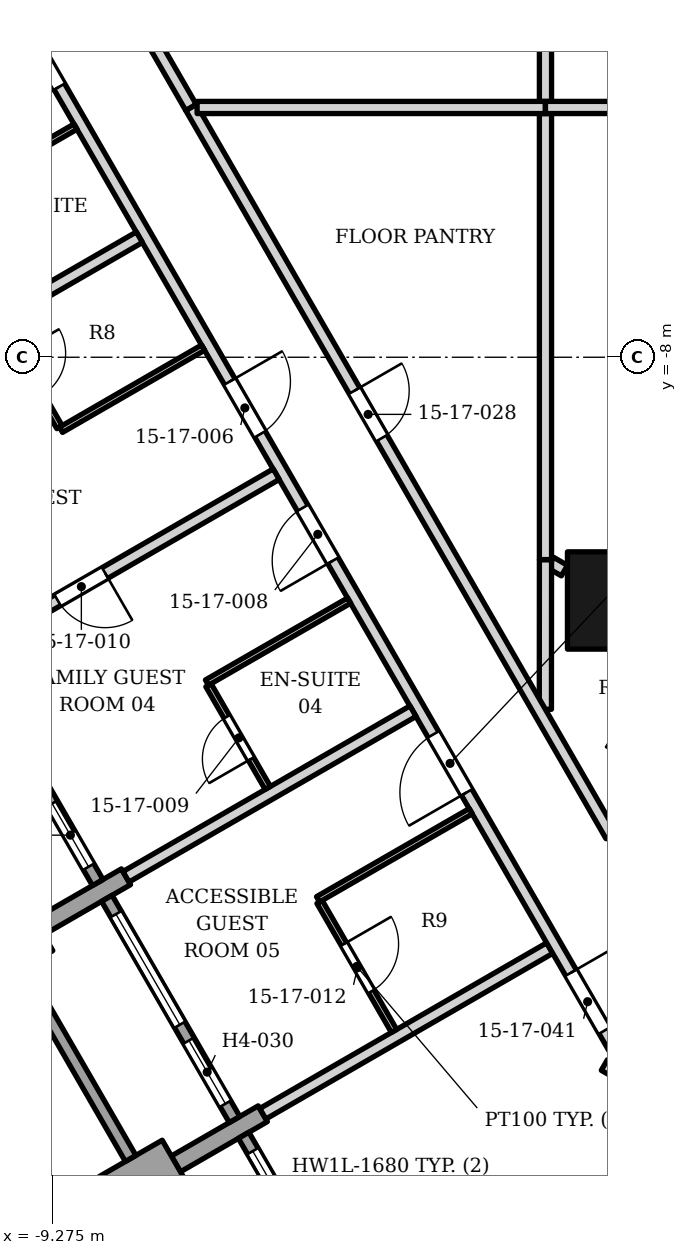
"""IFC4 building model, lengths in metres.
Left out: names, types, materials, properties, quantities, classifications, styles, units other than length and angle.
Written with IfcOpenShell. Run it as: python <this file> out.ifc"""

import sys

from ifc_helpers import new_model, si_unit, direction, frame, frame_2d, origin, origin_2d, place, context, subcontext, project, spatial, rectangle, extrude, element, fill, save


model = new_model("IFC4")
c1 = context("Model", 3, precision=1e-05, world=origin(), true_north=direction((0.0, 1.0)))
c2 = subcontext(c1, "Body", "Model", "MODEL_VIEW")
j1 = project(units=[si_unit("LENGTHUNIT", "METRE"), si_unit("PLANEANGLEUNIT", "RADIAN")], contexts=[c1])
p1 = place(None, origin())
s1 = spatial("IfcSite", under=j1, at=p1, CompositionType="ELEMENT")
p2 = place(p1, origin())
s2 = spatial("IfcBuilding", under=s1, at=p2, CompositionType="ELEMENT")
p3 = place(p2, frame((0.0, 0.0, 76.6)))
s3 = spatial("IfcBuildingStorey", under=s2, at=p3, CompositionType="ELEMENT", Elevation=76.6)
p4 = place(p3, frame((0.0, -12.0, 0.0), z_axis=(0.0, 0.0, 1.0), x_axis=(1.0, 0.0, 0.0)))
e1 = element("IfcColumn", 1, at=p4, inside=s3, PredefinedType="COLUMN", context=c2, shape_type="SweptSolid", body=[
    extrude(rectangle(XDim=1.6, YDim=1.6, at=origin_2d()), origin(), (0.0, 0.0, 1.0), 3.4),
])
p5 = place(p3, frame((-10.009, -17.669, 0.0), z_axis=(0.0, 0.0, 1.0), x_axis=(0.5, -0.866025403784, 0.0)))
e2 = element("IfcColumn", 2, at=p5, inside=s3, PredefinedType="COLUMN", context=c2, shape_type="SweptSolid", body=[
    extrude(rectangle(XDim=0.9, YDim=1.2, at=origin_2d()), origin(), (0.0, 0.0, 1.0), 3.4),
])
p6 = place(p3, frame((-9.49, -17.369, 0.0), z_axis=(0.0, 0.0, 1.0), x_axis=(0.865976140824, 0.500085316245, 0.0)))
e3 = element("IfcWall", 3, at=p6, inside=s3, PredefinedType="SOLIDWALL", context=c2, shape_type="SweptSolid", body=[
    extrude(rectangle(XDim=1.65, YDim=0.3, at=frame_2d((0.825, 0.0))), origin(), (0.0, 0.0, 1.0), 2.65),
])
p7 = place(p3, frame((-7.24, -21.266, 0.0), z_axis=(0.0, 0.0, 1.0), x_axis=(-0.866006032174, -0.500033551112, 0.0)))
e4 = element("IfcWall", 4, at=p7, inside=s3, PredefinedType="SOLIDWALL", context=c2, shape_type="SweptSolid", body=[
    extrude(rectangle(XDim=1.2, YDim=0.9, at=frame_2d((0.6, 0.0))), origin(), (0.0, 0.0, 1.0), 2.63),
])
p8 = place(p3, frame((-5.811, -20.441, 0.0), z_axis=(0.0, 0.0, 1.0), x_axis=(-0.866040211805, -0.499974350878, 0.0)))
e5 = element("IfcWall", 5, at=p8, inside=s3, PredefinedType="SOLIDWALL", context=c2, shape_type="SweptSolid", body=[
    extrude(rectangle(XDim=1.65, YDim=0.3, at=frame_2d((0.825, 0.0))), origin(), (0.0, 0.0, 1.0), 2.628),
])
p9 = place(p3, frame((-10.625, -13.001, 0.0), z_axis=(0.0, 0.0, 1.0), x_axis=(0.499958946799, -0.866049104564, 0.0)))
e6 = element("IfcWall", 6, at=p9, inside=s3, PredefinedType="ELEMENTEDWALL", context=c2, shape_type="SweptSolid", body=[
    extrude(rectangle(XDim=4.2, YDim=0.2, at=frame_2d((2.1, 0.0))), origin(), (0.0, 0.0, 1.0), 2.65),
])
p10 = place(p9, frame((0.3, 0.0, 0.6)))
e7 = element("IfcOpeningElement", 7, at=p10, cuts=e6, PredefinedType="OPENING", context=c2, shape_type="SweptSolid", body=[
    extrude(rectangle(XDim=2.1, YDim=1.8, at=frame_2d((1.05, 0.9))), frame((0.0, 0.11, 0.0), z_axis=(0.0, -1.0, 0.0), x_axis=(1.0, 0.0, 0.0)), (0.0, 0.0, 1.0), 0.22),
])
p11 = place(p9, frame((2.7, 0.0, 0.0)))
e8 = element("IfcOpeningElement", 8, at=p11, cuts=e6, PredefinedType="OPENING", context=c2, shape_type="SweptSolid", body=[
    extrude(rectangle(XDim=1.2, YDim=2.4, at=frame_2d((0.6, 1.2))), frame((0.0, 0.11, 0.0), z_axis=(0.0, -1.0, 0.0), x_axis=(1.0, 0.0, 0.0)), (0.0, 0.0, 1.0), 0.22),
])
p12 = place(p3, frame((-9.784, -18.058, 0.0), z_axis=(0.0, 0.0, 1.0), x_axis=(0.500012057535, -0.866018442252, 0.0)))
e9 = element("IfcWall", 9, at=p12, inside=s3, PredefinedType="SOLIDWALL", context=c2, shape_type="SweptSolid", body=[
    extrude(rectangle(XDim=3.6, YDim=0.2, at=frame_2d((1.8, 0.0))), origin(), (0.0, 0.0, 1.0), 2.63),
])
p13 = place(p3, frame((-8.375, -16.898, 0.0), z_axis=(0.0, 0.0, 1.0), x_axis=(0.49998411664, -0.866034573852, 0.0)))
e10 = element("IfcWall", 10, at=p13, inside=s3, PredefinedType="ELEMENTEDWALL", context=c2, shape_type="SweptSolid", body=[
    extrude(rectangle(XDim=4.2, YDim=0.2, at=frame_2d((2.1, 0.0))), origin(), (0.0, 0.0, 1.0), 2.628),
])
p14 = place(p13, frame((0.3, 0.0, 0.6)))
e11 = element("IfcOpeningElement", 11, at=p14, cuts=e10, PredefinedType="OPENING", context=c2, shape_type="SweptSolid", body=[
    extrude(rectangle(XDim=2.1, YDim=1.8, at=frame_2d((1.05, 0.9))), frame((0.0, 0.11, 0.0), z_axis=(0.0, -1.0, 0.0), x_axis=(1.0, 0.0, 0.0)), (0.0, 0.0, 1.0), 0.22),
])
p15 = place(p13, frame((2.7, 0.0, 0.0)))
e12 = element("IfcOpeningElement", 12, at=p15, cuts=e10, PredefinedType="OPENING", context=c2, shape_type="SweptSolid", body=[
    extrude(rectangle(XDim=1.2, YDim=2.4, at=frame_2d((0.6, 1.2))), frame((0.0, 0.11, 0.0), z_axis=(0.0, -1.0, 0.0), x_axis=(1.0, 0.0, 0.0)), (0.0, 0.0, 1.0), 0.22),
])
p16 = place(p3, frame((-6.125, -20.796, 0.0), z_axis=(0.0, 0.0, 1.0), x_axis=(0.49998411664, -0.866034573852, 0.0)))
e13 = element("IfcWall", 13, at=p16, inside=s3, PredefinedType="ELEMENTEDWALL", context=c2, shape_type="SweptSolid", body=[
    extrude(rectangle(XDim=4.2, YDim=0.2, at=frame_2d((2.1, 0.0))), origin(), (0.0, 0.0, 1.0), 2.384),
])
p17 = place(p16, frame((0.3, 0.0, 0.6)))
e14 = element("IfcOpeningElement", 14, at=p17, cuts=e13, PredefinedType="OPENING", context=c2, shape_type="SweptSolid", body=[
    extrude(rectangle(XDim=2.1, YDim=1.68, at=frame_2d((1.05, 0.84))), frame((0.0, 0.11, 0.0), z_axis=(0.0, -1.0, 0.0), x_axis=(1.0, 0.0, 0.0)), (0.0, 0.0, 1.0), 0.22),
])
p18 = place(p16, frame((2.7, 0.0, 0.0)))
e15 = element("IfcOpeningElement", 15, at=p18, cuts=e13, PredefinedType="OPENING", context=c2, shape_type="SweptSolid", body=[
    extrude(rectangle(XDim=1.2, YDim=2.28, at=frame_2d((0.6, 1.14))), frame((0.0, 0.11, 0.0), z_axis=(0.0, -1.0, 0.0), x_axis=(1.0, 0.0, 0.0)), (0.0, 0.0, 1.0), 0.22),
])
p19 = place(p3, frame((-5.81, -20.441, 0.0), z_axis=(0.0, 0.0, 1.0), x_axis=(0.866020710281, 0.500008129298, 0.0)))
e16 = element("IfcWall", 16, at=p19, inside=s3, PredefinedType="PARTITIONING", context=c2, shape_type="SweptSolid", body=[
    extrude(rectangle(XDim=5.45, YDim=0.2, at=frame_2d((2.725, 0.0))), origin(), (0.0, 0.0, 1.0), 2.384),
])
p20 = place(p3, frame((-0.193, -19.64, 0.0), z_axis=(0.0, 0.0, 1.0), x_axis=(0.866036131362, -0.49998141883, 0.0)))
e17 = element("IfcWall", 17, at=p20, inside=s3, PredefinedType="PARTITIONING", context=c2, shape_type="SweptSolid", body=[
    extrude(rectangle(XDim=2.802, YDim=0.2, at=frame_2d((1.401, 0.0))), origin(), (0.0, 0.0, 1.0), 2.384),
])
p21 = place(p3, frame((-11.206, 0.0, 0.0), z_axis=(0.0, 0.0, 1.0), x_axis=(0.500002959525, -0.866023695095, 0.0)))
e18 = element("IfcWall", 18, at=p21, inside=s3, PredefinedType="PARTITIONING", context=c2, shape_type="SweptSolid", body=[
    extrude(rectangle(XDim=22.351, YDim=0.2, at=frame_2d((11.175, 0.0))), origin(), (0.0, 0.0, 1.0), 2.242),
])
p22 = place(p21, frame((0.7, 0.0, 0.0)))
e19 = element("IfcOpeningElement", 19, at=p22, cuts=e18, PredefinedType="OPENING", context=c2, shape_type="SweptSolid", body=[
    extrude(rectangle(XDim=1.0, YDim=2.1, at=frame_2d((0.5, 1.05))), frame((0.0, 0.11, 0.0), z_axis=(0.0, -1.0, 0.0), x_axis=(1.0, 0.0, 0.0)), (0.0, 0.0, 1.0), 0.22),
])
p23 = place(p21, frame((3.1, 0.0, 0.0)))
e20 = element("IfcOpeningElement", 20, at=p23, cuts=e18, PredefinedType="OPENING", context=c2, shape_type="SweptSolid", body=[
    extrude(rectangle(XDim=1.0, YDim=2.1, at=frame_2d((0.5, 1.05))), frame((0.0, 0.11, 0.0), z_axis=(0.0, -1.0, 0.0), x_axis=(1.0, 0.0, 0.0)), (0.0, 0.0, 1.0), 0.22),
])
p24 = place(p21, frame((9.7, 0.0, 0.0)))
e21 = element("IfcOpeningElement", 21, at=p24, cuts=e18, PredefinedType="OPENING", context=c2, shape_type="SweptSolid", body=[
    extrude(rectangle(XDim=1.0, YDim=2.1, at=frame_2d((0.5, 1.05))), frame((0.0, 0.11, 0.0), z_axis=(0.0, -1.0, 0.0), x_axis=(1.0, 0.0, 0.0)), (0.0, 0.0, 1.0), 0.22),
])
p25 = place(p21, frame((12.1, 0.0, 0.0)))
e22 = element("IfcOpeningElement", 22, at=p25, cuts=e18, PredefinedType="OPENING", context=c2, shape_type="SweptSolid", body=[
    extrude(rectangle(XDim=1.0, YDim=2.1, at=frame_2d((0.5, 1.05))), frame((0.0, 0.11, 0.0), z_axis=(0.0, -1.0, 0.0), x_axis=(1.0, 0.0, 0.0)), (0.0, 0.0, 1.0), 0.22),
])
p26 = place(p21, frame((16.4, 0.0, 0.0)))
e23 = element("IfcOpeningElement", 23, at=p26, cuts=e18, PredefinedType="OPENING", context=c2, shape_type="SweptSolid", body=[
    extrude(rectangle(XDim=1.1, YDim=2.1, at=frame_2d((0.55, 1.05))), frame((0.0, 0.11, 0.0), z_axis=(0.0, -1.0, 0.0), x_axis=(1.0, 0.0, 0.0)), (0.0, 0.0, 1.0), 0.22),
])
p27 = place(p21, frame((20.925, 0.0, 0.0)))
e24 = element("IfcOpeningElement", 24, at=p27, cuts=e18, PredefinedType="OPENING", context=c2, shape_type="SweptSolid", body=[
    extrude(rectangle(XDim=1.1, YDim=2.1, at=frame_2d((0.55, 1.05))), frame((0.0, 0.11, 0.0), z_axis=(0.0, -1.0, 0.0), x_axis=(1.0, 0.0, 0.0)), (0.0, 0.0, 1.0), 0.22),
])
p28 = place(p3, frame((-4.877, -16.957, 0.0), z_axis=(0.0, 0.0, 1.0), x_axis=(0.500018594424, -0.866014668023, 0.0)))
e25 = element("IfcWall", 25, at=p28, inside=s3, PredefinedType="PARTITIONING", context=c2, shape_type="SweptSolid", body=[
    extrude(rectangle(XDim=2.45, YDim=0.1, at=frame_2d((1.225, 0.0))), origin(), (0.0, 0.0, 1.0), 2.384),
])
p29 = place(p28, frame((0.8, 0.0, 0.0)))
e26 = element("IfcOpeningElement", 26, at=p29, cuts=e25, PredefinedType="OPENING", context=c2, shape_type="SweptSolid", body=[
    extrude(rectangle(XDim=0.9, YDim=2.1, at=frame_2d((0.45, 1.05))), frame((0.0, 0.06, 0.0), z_axis=(0.0, -1.0, 0.0), x_axis=(1.0, 0.0, 0.0)), (0.0, 0.0, 1.0), 0.12),
])
p30 = place(p3, frame((-4.902, -16.914, 0.0), z_axis=(0.0, 0.0, 1.0), x_axis=(0.866293497561, 0.499535360193, 0.0)))
e27 = element("IfcWall", 27, at=p30, inside=s3, PredefinedType="PARTITIONING", context=c2, shape_type="SweptSolid", body=[
    extrude(rectangle(XDim=2.9, YDim=0.1, at=frame_2d((1.45, 0.0))), origin(), (0.0, 0.0, 1.0), 2.384),
])
p31 = place(p3, frame((-8.061, -16.544, 0.0), z_axis=(0.0, 0.0, 1.0), x_axis=(0.866193043817, 0.499709526468, 0.0)))
e28 = element("IfcWall", 28, at=p31, inside=s3, PredefinedType="PARTITIONING", context=c2, shape_type="SweptSolid", body=[
    extrude(rectangle(XDim=5.45, YDim=0.2, at=frame_2d((2.725, 0.0))), origin(), (0.0, 0.0, 1.0), 2.384),
])
p32 = place(p3, frame((-6.704, -13.393, 0.0), z_axis=(0.0, 0.0, 1.0), x_axis=(0.500098182527, -0.865968710655, 0.0)))
e29 = element("IfcWall", 29, at=p32, inside=s3, PredefinedType="PARTITIONING", context=c2, shape_type="SweptSolid", body=[
    extrude(rectangle(XDim=1.95, YDim=0.1, at=frame_2d((0.975, 0.0))), origin(), (0.0, 0.0, 1.0), 2.628),
])
p33 = place(p32, frame((0.6, 0.0, 0.0)))
e30 = element("IfcOpeningElement", 30, at=p33, cuts=e29, PredefinedType="OPENING", context=c2, shape_type="SweptSolid", body=[
    extrude(rectangle(XDim=0.8, YDim=2.1, at=frame_2d((0.4, 1.05))), frame((0.0, 0.06, 0.0), z_axis=(0.0, -1.0, 0.0), x_axis=(1.0, 0.0, 0.0)), (0.0, 0.0, 1.0), 0.12),
])
p34 = place(p3, frame((-6.729, -13.35, 0.0), z_axis=(0.0, 0.0, 1.0), x_axis=(0.866339109022, 0.499456252518, 0.0)))
e31 = element("IfcWall", 31, at=p34, inside=s3, PredefinedType="PARTITIONING", context=c2, shape_type="SweptSolid", body=[
    extrude(rectangle(XDim=2.7, YDim=0.1, at=frame_2d((1.35, 0.0))), origin(), (0.0, 0.0, 1.0), 2.384),
])
p35 = place(p3, frame((-1.075, -11.378, 0.0), z_axis=(0.0, 0.0, 1.0), x_axis=(0.863710940107, -0.50398751169, 0.0)))
e32 = element("IfcWall", 32, at=p35, inside=s3, PredefinedType="PARTITIONING", context=c2, shape_type="SweptSolid", body=[
    extrude(rectangle(XDim=0.26, YDim=0.2, at=frame_2d((0.13, 0.0))), origin(), (0.0, 0.0, 1.0), 3.23),
])
p36 = place(p3, frame((-1.163, -13.79, 0.0), z_axis=(0.0, 0.0, 1.0), x_axis=(0.000595415197, 0.99999982274, 0.0)))
e33 = element("IfcWall", 33, at=p36, inside=s3, PredefinedType="PARTITIONING", context=c2, shape_type="SweptSolid", body=[
    extrude(rectangle(XDim=2.46, YDim=0.2, at=frame_2d((1.23, 0.0))), origin(), (0.0, 0.0, 1.0), 2.45),
])
p37 = place(p3, frame((-10.311, -12.646, 0.0), z_axis=(0.0, 0.0, 1.0), x_axis=(0.866193043817, 0.499709526468, 0.0)))
e34 = element("IfcWall", 34, at=p37, inside=s3, PredefinedType="PARTITIONING", context=c2, shape_type="SweptSolid", body=[
    extrude(rectangle(XDim=5.45, YDim=0.2, at=frame_2d((2.725, 0.0))), origin(), (0.0, 0.0, 1.0), 2.242),
])
p38 = place(p37, frame((1.3, 0.0, 0.0)))
e35 = element("IfcOpeningElement", 35, at=p38, cuts=e34, PredefinedType="OPENING", context=c2, shape_type="SweptSolid", body=[
    extrude(rectangle(XDim=0.9, YDim=2.1, at=frame_2d((0.45, 1.05))), frame((0.0, 0.11, 0.0), z_axis=(0.0, -1.0, 0.0), x_axis=(1.0, 0.0, 0.0)), (0.0, 0.0, 1.0), 0.22),
])
p39 = place(p3, frame((-9.129, -9.193, 0.0), z_axis=(0.0, 0.0, 1.0), x_axis=(0.865671764241, 0.500612022024, 0.0)))
e36 = element("IfcWall", 36, at=p39, inside=s3, PredefinedType="PARTITIONING", context=c2, shape_type="SweptSolid", body=[
    extrude(rectangle(XDim=2.7, YDim=0.1, at=frame_2d((1.35, 0.0))), origin(), (0.0, 0.0, 1.0), 2.242),
])
p40 = place(p3, frame((-10.127, -7.46, 0.0), z_axis=(0.0, 0.0, 1.0), x_axis=(0.499223742716, -0.866473112514, 0.0)))
e37 = element("IfcWall", 37, at=p40, inside=s3, PredefinedType="PARTITIONING", context=c2, shape_type="SweptSolid", body=[
    extrude(rectangle(XDim=1.95, YDim=0.1, at=frame_2d((0.975, 0.0))), origin(), (0.0, 0.0, 1.0), 2.473),
])
p41 = place(p40, frame((0.55, 0.0, 0.0)))
e38 = element("IfcOpeningElement", 38, at=p41, cuts=e37, PredefinedType="OPENING", context=c2, shape_type="SweptSolid", body=[
    extrude(rectangle(XDim=0.8, YDim=2.1, at=frame_2d((0.4, 1.05))), frame((0.0, 0.06, 0.0), z_axis=(0.0, -1.0, 0.0), x_axis=(1.0, 0.0, 0.0)), (0.0, 0.0, 1.0), 0.12),
])
p42 = place(p3, frame((-10.178, -7.376, 0.0), z_axis=(0.0, 0.0, 1.0), x_axis=(0.866036505625, 0.499980770555, 0.0)))
e39 = element("IfcWall", 39, at=p42, inside=s3, PredefinedType="PARTITIONING", context=c2, shape_type="SweptSolid", body=[
    extrude(rectangle(XDim=2.7, YDim=0.2, at=frame_2d((1.35, 0.0))), origin(), (0.0, 0.0, 1.0), 2.473),
])
p43 = place(p3, frame((-11.229, -5.556, 0.0), z_axis=(0.0, 0.0, 1.0), x_axis=(0.866339109022, 0.499456252518, 0.0)))
e40 = element("IfcWall", 40, at=p43, inside=s3, PredefinedType="PARTITIONING", context=c2, shape_type="SweptSolid", body=[
    extrude(rectangle(XDim=2.7, YDim=0.1, at=frame_2d((1.35, 0.0))), origin(), (0.0, 0.0, 1.0), 2.242),
])
p44 = place(p3, frame((-1.162, -11.327, 0.0), z_axis=(0.0, 0.0, 1.0), x_axis=(0.0, 1.0, 0.0)))
e41 = element("IfcWall", 41, at=p44, inside=s3, PredefinedType="PARTITIONING", context=c2, shape_type="SweptSolid", body=[
    extrude(rectangle(XDim=7.335, YDim=0.2, at=frame_2d((3.667, 0.0))), origin(), (0.0, 0.0, 1.0), 3.23),
])
p45 = place(p3, frame((-6.991, -3.893, 0.0), z_axis=(0.0, 0.0, 1.0), x_axis=(0.499865112403, -0.86610326717, 0.0)))
e42 = element("IfcWall", 42, at=p45, inside=s3, PredefinedType="PARTITIONING", context=c2, shape_type="SweptSolid", body=[
    extrude(rectangle(XDim=13.827, YDim=0.2, at=frame_2d((6.914, 0.0))), origin(), (0.0, 0.0, 1.0), 2.242),
])
p46 = place(p45, frame((5.377, 0.0, 0.0)))
e43 = element("IfcOpeningElement", 43, at=p46, cuts=e42, PredefinedType="OPENING", context=c2, shape_type="SweptSolid", body=[
    extrude(rectangle(XDim=0.9, YDim=2.1, at=frame_2d((0.45, 1.05))), frame((0.0, 0.11, 0.0), z_axis=(0.0, -1.0, 0.0), x_axis=(1.0, 0.0, 0.0)), (0.0, 0.0, 1.0), 0.22),
])
p47 = place(p3, frame((-6.891, -3.893, 0.0), z_axis=(0.0, 0.0, 1.0), x_axis=(1.0, 0.0, 0.0)))
e44 = element("IfcWall", 44, at=p47, inside=s3, PredefinedType="PARTITIONING", context=c2, shape_type="SweptSolid", body=[
    extrude(rectangle(XDim=5.727, YDim=0.2, at=frame_2d((2.864, 0.0))), origin(), (0.0, 0.0, 1.0), 2.242),
])
p48 = place(p3, frame((-1.162, -3.893, 0.0), z_axis=(0.0, 0.0, 1.0), x_axis=(0.999999970181, 0.000244207691, 0.0)))
e45 = element("IfcWall", 45, at=p48, inside=s3, PredefinedType="PARTITIONING", context=c2, shape_type="SweptSolid", body=[
    extrude(rectangle(XDim=7.998, YDim=0.2, at=frame_2d((3.999, 0.0))), origin(), (0.0, 0.0, 1.0), 3.23),
])
p49 = place(p3, frame((-1.162, -3.791, 0.0), z_axis=(0.0, 0.0, 1.0), x_axis=(0.0, 1.0, 0.0)))
e46 = element("IfcWall", 46, at=p49, inside=s3, PredefinedType="PARTITIONING", context=c2, shape_type="SweptSolid", body=[
    extrude(rectangle(XDim=5.743, YDim=0.2, at=frame_2d((2.872, 0.0))), origin(), (0.0, 0.0, 1.0), 3.23),
])
p50 = place(p3, frame((-11.376, 3.7, 0.0), z_axis=(0.0, 0.0, 1.0), x_axis=(0.500182929981, -0.865919763347, 0.0)))
e47 = element("IfcWall", 47, at=p50, inside=s3, PredefinedType="PARTITIONING", context=c2, shape_type="SweptSolid", body=[
    extrude(rectangle(XDim=8.765, YDim=0.2, at=frame_2d((4.383, 0.0))), origin(), (0.0, 0.0, 1.0), 2.242),
])
p51 = place(p50, frame((4.683, 0.0, 0.0)))
e48 = element("IfcOpeningElement", 48, at=p51, cuts=e47, PredefinedType="OPENING", context=c2, shape_type="SweptSolid", body=[
    extrude(rectangle(XDim=1.6, YDim=2.1, at=frame_2d((0.8, 1.05))), frame((0.0, 0.11, 0.0), z_axis=(0.0, -1.0, 0.0), x_axis=(1.0, 0.0, 0.0)), (0.0, 0.0, 1.0), 0.22),
])
p52 = place(p11, origin())
e49 = element("IfcDoor", 49, at=p52, inside=s3, OperationType="SINGLE_SWING_LEFT", PredefinedType="DOOR", context=c2, shape_type="SweptSolid", body=[
    extrude(rectangle(XDim=1.2, YDim=2.4, at=frame_2d((0.6, 1.2))), frame((0.0, 0.025, 0.0), z_axis=(0.0, -1.0, 0.0), x_axis=(1.0, 0.0, 0.0)), (0.0, 0.0, 1.0), 0.05),
])
fill(e8, e49)
p53 = place(p14, origin())
e50 = element("IfcWindow", 50, at=p53, inside=s3, PartitioningType="SINGLE_PANEL", PredefinedType="WINDOW", context=c2, shape_type="SweptSolid", body=[
    extrude(rectangle(XDim=2.1, YDim=1.8, at=frame_2d((1.05, 0.9))), frame((0.0, 0.03, 0.0), z_axis=(0.0, -1.0, 0.0), x_axis=(1.0, 0.0, 0.0)), (0.0, 0.0, 1.0), 0.06),
])
fill(e11, e50)
p54 = place(p15, origin())
e51 = element("IfcDoor", 51, at=p54, inside=s3, OperationType="SINGLE_SWING_LEFT", PredefinedType="DOOR", context=c2, shape_type="SweptSolid", body=[
    extrude(rectangle(XDim=1.2, YDim=2.4, at=frame_2d((0.6, 1.2))), frame((0.0, 0.025, 0.0), z_axis=(0.0, -1.0, 0.0), x_axis=(1.0, 0.0, 0.0)), (0.0, 0.0, 1.0), 0.05),
])
fill(e12, e51)
p55 = place(p17, origin())
e52 = element("IfcWindow", 52, at=p55, inside=s3, PartitioningType="SINGLE_PANEL", PredefinedType="WINDOW", context=c2, shape_type="SweptSolid", body=[
    extrude(rectangle(XDim=2.1, YDim=1.68, at=frame_2d((1.05, 0.84))), frame((0.0, 0.03, 0.0), z_axis=(0.0, -1.0, 0.0), x_axis=(1.0, 0.0, 0.0)), (0.0, 0.0, 1.0), 0.06),
])
fill(e14, e52)
p56 = place(p23, origin())
e53 = element("IfcDoor", 53, at=p56, inside=s3, OperationType="SINGLE_SWING_RIGHT", PredefinedType="DOOR", context=c2, shape_type="SweptSolid", body=[
    extrude(rectangle(XDim=1.0, YDim=2.1, at=frame_2d((0.5, 1.05))), frame((0.0, 0.025, 0.0), z_axis=(0.0, -1.0, 0.0), x_axis=(1.0, 0.0, 0.0)), (0.0, 0.0, 1.0), 0.05),
])
fill(e20, e53)
p57 = place(p24, origin())
e54 = element("IfcDoor", 54, at=p57, inside=s3, OperationType="SINGLE_SWING_LEFT", PredefinedType="DOOR", context=c2, shape_type="SweptSolid", body=[
    extrude(rectangle(XDim=1.0, YDim=2.1, at=frame_2d((0.5, 1.05))), frame((0.0, 0.025, 0.0), z_axis=(0.0, -1.0, 0.0), x_axis=(1.0, 0.0, 0.0)), (0.0, 0.0, 1.0), 0.05),
])
fill(e21, e54)
p58 = place(p25, origin())
e55 = element("IfcDoor", 55, at=p58, inside=s3, OperationType="SINGLE_SWING_RIGHT", PredefinedType="DOOR", context=c2, shape_type="SweptSolid", body=[
    extrude(rectangle(XDim=1.0, YDim=2.1, at=frame_2d((0.5, 1.05))), frame((0.0, 0.025, 0.0), z_axis=(0.0, -1.0, 0.0), x_axis=(1.0, 0.0, 0.0)), (0.0, 0.0, 1.0), 0.05),
])
fill(e22, e55)
p59 = place(p33, origin())
e56 = element("IfcDoor", 56, at=p59, inside=s3, OperationType="SINGLE_SWING_RIGHT", PredefinedType="DOOR", context=c2, shape_type="SweptSolid", body=[
    extrude(rectangle(XDim=0.8, YDim=2.1, at=frame_2d((0.4, 1.05))), frame((0.0, 0.025, 0.0), z_axis=(0.0, -1.0, 0.0), x_axis=(1.0, 0.0, 0.0)), (0.0, 0.0, 1.0), 0.05),
])
fill(e30, e56)
p60 = place(p38, origin())
e57 = element("IfcDoor", 57, at=p60, inside=s3, OperationType="SINGLE_SWING_RIGHT", PredefinedType="DOOR", context=c2, shape_type="SweptSolid", body=[
    extrude(rectangle(XDim=0.9, YDim=2.1, at=frame_2d((0.45, 1.05))), frame((0.0, 0.025, 0.0), z_axis=(0.0, -1.0, 0.0), x_axis=(1.0, 0.0, 0.0)), (0.0, 0.0, 1.0), 0.05),
])
fill(e35, e57)
p61 = place(p26, origin())
e58 = element("IfcDoor", 58, at=p61, inside=s3, OperationType="SINGLE_SWING_RIGHT", PredefinedType="DOOR", context=c2, shape_type="SweptSolid", body=[
    extrude(rectangle(XDim=1.1, YDim=2.1, at=frame_2d((0.55, 1.05))), frame((0.0, 0.025, 0.0), z_axis=(0.0, -1.0, 0.0), x_axis=(1.0, 0.0, 0.0)), (0.0, 0.0, 1.0), 0.05),
])
fill(e23, e58)
p62 = place(p29, origin())
e59 = element("IfcDoor", 59, at=p62, inside=s3, OperationType="SINGLE_SWING_LEFT", PredefinedType="DOOR", context=c2, shape_type="SweptSolid", body=[
    extrude(rectangle(XDim=0.9, YDim=2.1, at=frame_2d((0.45, 1.05))), frame((0.0, 0.025, 0.0), z_axis=(0.0, -1.0, 0.0), x_axis=(1.0, 0.0, 0.0)), (0.0, 0.0, 1.0), 0.05),
])
fill(e26, e59)
p63 = place(p46, origin())
e60 = element("IfcDoor", 60, at=p63, inside=s3, OperationType="SINGLE_SWING_LEFT", PredefinedType="DOOR", context=c2, shape_type="SweptSolid", body=[
    extrude(rectangle(XDim=0.9, YDim=2.1, at=frame_2d((0.45, 1.05))), frame((0.0, 0.025, 0.0), z_axis=(0.0, -1.0, 0.0), x_axis=(1.0, 0.0, 0.0)), (0.0, 0.0, 1.0), 0.05),
])
fill(e43, e60)
p64 = place(p27, origin())
e61 = element("IfcDoor", 61, at=p64, inside=s3, OperationType="SINGLE_SWING_LEFT", PredefinedType="DOOR", context=c2, shape_type="SweptSolid", body=[
    extrude(rectangle(XDim=1.1, YDim=2.1, at=frame_2d((0.55, 1.05))), frame((0.0, 0.025, 0.0), z_axis=(0.0, -1.0, 0.0), x_axis=(1.0, 0.0, 0.0)), (0.0, 0.0, 1.0), 0.05),
])
fill(e24, e61)
save(model, sys.argv[1])
